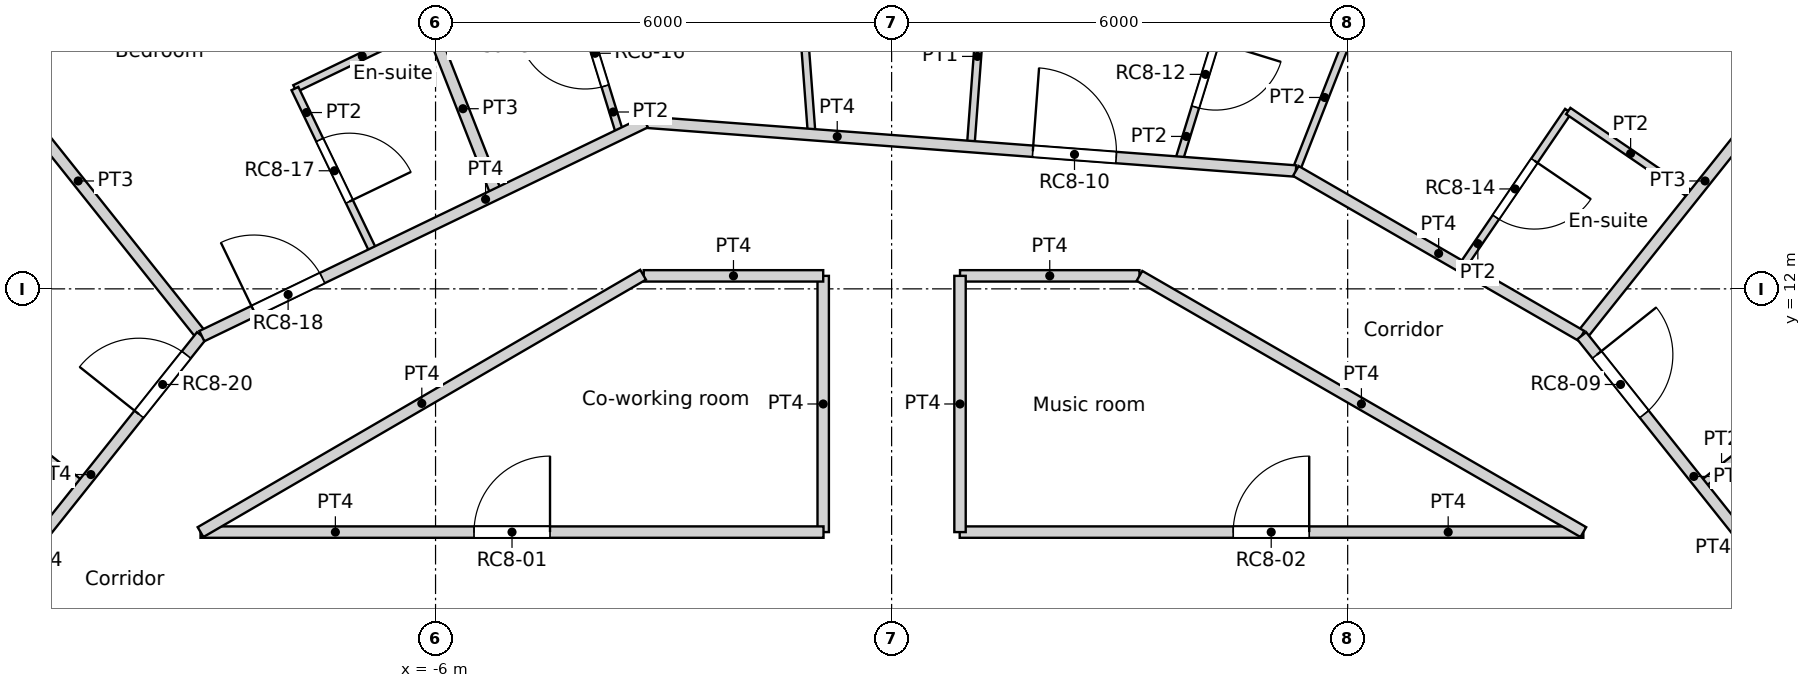
"""IFC4 building model, lengths in metres.
Left out: names, types, materials, properties, quantities, classifications, styles, units other than length and angle.
Written with IfcOpenShell. Run it as: python <this file> out.ifc"""

import sys

from ifc_helpers import new_model, si_unit, direction, frame, frame_2d, origin, place, context, subcontext, project, spatial, rectangle, extrude, element, fill, save


model = new_model("IFC4")
c1 = context("Model", 3, precision=1e-05, world=origin(), true_north=direction((0.0, 1.0)))
c2 = subcontext(c1, "Body", "Model", "MODEL_VIEW")
j1 = project(units=[si_unit("LENGTHUNIT", "METRE"), si_unit("PLANEANGLEUNIT", "RADIAN")], contexts=[c1])
p1 = place(None, origin())
s1 = spatial("IfcSite", under=j1, at=p1, CompositionType="ELEMENT")
p2 = place(p1, origin())
s2 = spatial("IfcBuilding", under=s1, at=p2, CompositionType="ELEMENT")
p3 = place(p2, frame((0.0, 0.0, 305.4)))
s3 = spatial("IfcBuildingStorey", under=s2, at=p3, CompositionType="ELEMENT", Elevation=305.4)
p4 = place(p3, frame((-9.092, 8.8, 0.0), z_axis=(0.0, 0.0, 1.0), x_axis=(0.864470922103, 0.502682827277, 0.0)))
e1 = element("IfcWall", 1, at=p4, inside=s3, PredefinedType="PARTITIONING", context=c2, shape_type="SweptSolid", body=[
    extrude(rectangle(XDim=6.735, YDim=0.15, at=frame_2d((3.368, 0.0))), origin(), (0.0, 0.0, 1.0), 3.25),
])
p5 = place(p3, frame((-9.092, 8.8, 0.0), z_axis=(0.0, 0.0, 1.0), x_axis=(1.0, 0.0, 0.0)))
e2 = element("IfcWall", 2, at=p5, inside=s3, PredefinedType="PARTITIONING", context=c2, shape_type="SweptSolid", body=[
    extrude(rectangle(XDim=8.196, YDim=0.15, at=frame_2d((4.098, 0.0))), origin(), (0.0, 0.0, 1.0), 3.25),
])
p6 = place(p5, frame((3.598, 0.0, 0.0)))
e3 = element("IfcOpeningElement", 3, at=p6, cuts=e2, PredefinedType="OPENING", context=c2, shape_type="SweptSolid", body=[
    extrude(rectangle(XDim=1.0, YDim=2.04, at=frame_2d((0.5, 1.02))), frame((0.0, 0.075, 0.0), z_axis=(0.0, -1.0, 0.0), x_axis=(1.0, 0.0, 0.0)), (0.0, 0.0, 1.0), 0.15),
])
p7 = place(p3, frame((0.896, 8.8, 0.0), z_axis=(0.0, 0.0, 1.0), x_axis=(1.0, 0.0, 0.0)))
e4 = element("IfcWall", 4, at=p7, inside=s3, PredefinedType="PARTITIONING", context=c2, shape_type="SweptSolid", body=[
    extrude(rectangle(XDim=8.205, YDim=0.15, at=frame_2d((4.102, 0.0))), origin(), (0.0, 0.0, 1.0), 3.25),
])
p8 = place(p7, frame((3.598, 0.0, 0.0)))
e5 = element("IfcOpeningElement", 5, at=p8, cuts=e4, PredefinedType="OPENING", context=c2, shape_type="SweptSolid", body=[
    extrude(rectangle(XDim=1.0, YDim=2.04, at=frame_2d((0.5, 1.02))), frame((0.0, 0.075, 0.0), z_axis=(0.0, -1.0, 0.0), x_axis=(1.0, 0.0, 0.0)), (0.0, 0.0, 1.0), 0.15),
])
p9 = place(p3, frame((9.079, 11.384, 0.0), z_axis=(0.0, 0.0, 1.0), x_axis=(0.623165080354, -0.782090328944, 0.0)))
e6 = element("IfcWall", 6, at=p9, inside=s3, PredefinedType="PARTITIONING", context=c2, shape_type="SweptSolid", body=[
    extrude(rectangle(XDim=3.564, YDim=0.15, at=frame_2d((1.782, 0.0))), origin(), (0.0, 0.0, 1.0), 3.25),
])
p10 = place(p9, frame((0.32, 0.0, 0.0)))
e7 = element("IfcOpeningElement", 7, at=p10, cuts=e6, PredefinedType="OPENING", context=c2, shape_type="SweptSolid", body=[
    extrude(rectangle(XDim=1.0, YDim=2.1, at=frame_2d((0.5, 1.05))), frame((0.0, 0.075, 0.0), z_axis=(0.0, -1.0, 0.0), x_axis=(1.0, 0.0, 0.0)), (0.0, 0.0, 1.0), 0.15),
])
p11 = place(p3, frame((-11.136, 8.802, 0.0), z_axis=(0.0, 0.0, 1.0), x_axis=(0.623151397235, 0.782101231379, 0.0)))
e8 = element("IfcWall", 8, at=p11, inside=s3, PredefinedType="PARTITIONING", context=c2, shape_type="SweptSolid", body=[
    extrude(rectangle(XDim=3.301, YDim=0.15, at=frame_2d((1.65, 0.0))), origin(), (0.0, 0.0, 1.0), 3.25),
])
p12 = place(p11, frame((1.981, 0.0, 0.0)))
e9 = element("IfcOpeningElement", 9, at=p12, cuts=e8, PredefinedType="OPENING", context=c2, shape_type="SweptSolid", body=[
    extrude(rectangle(XDim=1.0, YDim=2.1, at=frame_2d((0.5, 1.05))), frame((0.0, 0.075, 0.0), z_axis=(0.0, -1.0, 0.0), x_axis=(1.0, 0.0, 0.0)), (0.0, 0.0, 1.0), 0.15),
])
p13 = place(p3, frame((-0.9, 8.8, 0.0), z_axis=(0.0, 0.0, 1.0), x_axis=(0.0, 1.0, 0.0)))
e10 = element("IfcWall", 10, at=p13, inside=s3, PredefinedType="PARTITIONING", context=c2, shape_type="SweptSolid", body=[
    extrude(rectangle(XDim=3.371, YDim=0.15, at=frame_2d((1.686, 0.0))), origin(), (0.0, 0.0, 1.0), 3.25),
])
p14 = place(p3, frame((-3.261, 12.171, 0.0), z_axis=(0.0, 0.0, 1.0), x_axis=(1.0, 0.0, 0.0)))
e11 = element("IfcWall", 11, at=p14, inside=s3, PredefinedType="PARTITIONING", context=c2, shape_type="SweptSolid", body=[
    extrude(rectangle(XDim=2.361, YDim=0.15, at=frame_2d((1.181, 0.0))), origin(), (0.0, 0.0, 1.0), 3.25),
])
p15 = place(p3, frame((3.261, 12.171, 0.0), z_axis=(0.0, 0.0, 1.0), x_axis=(0.866066809554, -0.499928276245, 0.0)))
e12 = element("IfcWall", 12, at=p15, inside=s3, PredefinedType="PARTITIONING", context=c2, shape_type="SweptSolid", body=[
    extrude(rectangle(XDim=6.743, YDim=0.15, at=frame_2d((3.371, 0.0))), origin(), (0.0, 0.0, 1.0), 3.25),
])
p16 = place(p3, frame((0.9, 12.171, 0.0), z_axis=(0.0, 0.0, 1.0), x_axis=(1.0, 0.0, 0.0)))
e13 = element("IfcWall", 13, at=p16, inside=s3, PredefinedType="PARTITIONING", context=c2, shape_type="SweptSolid", body=[
    extrude(rectangle(XDim=2.361, YDim=0.15, at=frame_2d((1.181, 0.0))), origin(), (0.0, 0.0, 1.0), 3.25),
])
p17 = place(p3, frame((0.9, 8.8, 0.0), z_axis=(0.0, 0.0, 1.0), x_axis=(0.0, 1.0, 0.0)))
e14 = element("IfcWall", 14, at=p17, inside=s3, PredefinedType="PARTITIONING", context=c2, shape_type="SweptSolid", body=[
    extrude(rectangle(XDim=3.371, YDim=0.15, at=frame_2d((1.686, 0.0))), origin(), (0.0, 0.0, 1.0), 3.25),
])
p18 = place(p3, frame((-3.239, 14.193, 0.0), z_axis=(0.0, 0.0, 1.0), x_axis=(0.997187999346, -0.074940602878, 0.0)))
e15 = element("IfcWall", 15, at=p18, inside=s3, PredefinedType="PARTITIONING", context=c2, shape_type="SweptSolid", body=[
    extrude(rectangle(XDim=8.581, YDim=0.15, at=frame_2d((4.291, 0.0))), origin(), (0.0, 0.0, 1.0), 3.25),
])
p19 = place(p18, frame((5.111, 0.0, 0.0)))
e16 = element("IfcOpeningElement", 16, at=p19, cuts=e15, PredefinedType="OPENING", context=c2, shape_type="SweptSolid", body=[
    extrude(rectangle(XDim=1.1, YDim=2.1, at=frame_2d((0.55, 1.05))), frame((0.0, 0.075, 0.0), z_axis=(0.0, -1.0, 0.0), x_axis=(1.0, 0.0, 0.0)), (0.0, 0.0, 1.0), 0.15),
])
p20 = place(p3, frame((5.318, 13.551, 0.0), z_axis=(0.0, 0.0, 1.0), x_axis=(0.865990693744, -0.500060114735, 0.0)))
e17 = element("IfcWall", 17, at=p20, inside=s3, PredefinedType="PARTITIONING", context=c2, shape_type="SweptSolid", body=[
    extrude(rectangle(XDim=4.339, YDim=0.15, at=frame_2d((2.17, 0.0))), origin(), (0.0, 0.0, 1.0), 3.25),
])
p21 = place(p3, frame((-9.075, 11.378, 0.0), z_axis=(0.0, 0.0, 1.0), x_axis=(0.900778421649, 0.434278983018, 0.0)))
e18 = element("IfcWall", 18, at=p21, inside=s3, PredefinedType="PARTITIONING", context=c2, shape_type="SweptSolid", body=[
    extrude(rectangle(XDim=6.479, YDim=0.15, at=frame_2d((3.239, 0.0))), origin(), (0.0, 0.0, 1.0), 3.25),
])
p22 = place(p21, frame((0.76, 0.0, 0.0)))
e19 = element("IfcOpeningElement", 19, at=p22, cuts=e18, PredefinedType="OPENING", context=c2, shape_type="SweptSolid", body=[
    extrude(rectangle(XDim=1.0, YDim=2.1, at=frame_2d((0.5, 1.05))), frame((0.0, 0.075, 0.0), z_axis=(0.0, -1.0, 0.0), x_axis=(1.0, 0.0, 0.0)), (0.0, 0.0, 1.0), 0.15),
])
p23 = place(p3, frame((10.645, 9.413, 0.0), z_axis=(0.0, 0.0, 1.0), x_axis=(0.781830263661, 0.623491330191, 0.0)))
e20 = element("IfcWall", 20, at=p23, inside=s3, PredefinedType="PARTITIONING", context=c2, shape_type="SweptSolid", body=[
    extrude(rectangle(XDim=2.401, YDim=0.1, at=frame_2d((1.2, 0.0))), origin(), (0.0, 0.0, 1.0), 3.25),
])
p24 = place(p23, frame((0.751, 0.0, 0.0)))
e21 = element("IfcOpeningElement", 21, at=p24, cuts=e20, PredefinedType="OPENING", context=c2, shape_type="SweptSolid", body=[
    extrude(rectangle(XDim=0.9, YDim=2.04, at=frame_2d((0.45, 1.02))), frame((0.0, 0.05, 0.0), z_axis=(0.0, -1.0, 0.0), x_axis=(1.0, 0.0, 0.0)), (0.0, 0.0, 1.0), 0.1),
])
p25 = place(p3, frame((9.076, 11.381, 0.0), z_axis=(0.0, 0.0, 1.0), x_axis=(0.623409504508, 0.781895510723, 0.0)))
e22 = element("IfcWall", 22, at=p25, inside=s3, PredefinedType="PARTITIONING", context=c2, shape_type="SweptSolid", body=[
    extrude(rectangle(XDim=5.214, YDim=0.15, at=frame_2d((2.607, 0.0))), origin(), (0.0, 0.0, 1.0), 3.25),
])
p26 = place(p3, frame((1.04, 13.871, 0.0), z_axis=(0.0, 0.0, 1.0), x_axis=(0.074724712234, 0.997204200443, 0.0)))
e23 = element("IfcWall", 23, at=p26, inside=s3, PredefinedType="PARTITIONING", context=c2, shape_type="SweptSolid", body=[
    extrude(rectangle(XDim=5.861, YDim=0.1, at=frame_2d((2.931, 0.0))), origin(), (0.0, 0.0, 1.0), 3.25),
])
p27 = place(p26, frame((2.431, 0.0, 0.0)))
e24 = element("IfcOpeningElement", 24, at=p27, cuts=e23, PredefinedType="OPENING", context=c2, shape_type="SweptSolid", body=[
    extrude(rectangle(XDim=1.0, YDim=2.04, at=frame_2d((0.5, 1.02))), frame((0.0, 0.05, 0.0), z_axis=(0.0, -1.0, 0.0), x_axis=(1.0, 0.0, 0.0)), (0.0, 0.0, 1.0), 0.1),
])
p28 = place(p3, frame((3.773, 13.667, 0.0), z_axis=(0.0, 0.0, 1.0), x_axis=(0.295086629105, 0.955470502592, 0.0)))
e25 = element("IfcWall", 25, at=p28, inside=s3, PredefinedType="PARTITIONING", context=c2, shape_type="SweptSolid", body=[
    extrude(rectangle(XDim=2.417, YDim=0.1, at=frame_2d((1.208, 0.0))), origin(), (0.0, 0.0, 1.0), 3.25),
])
p29 = place(p28, frame((0.759, 0.0, 0.0)))
e26 = element("IfcOpeningElement", 26, at=p29, cuts=e25, PredefinedType="OPENING", context=c2, shape_type="SweptSolid", body=[
    extrude(rectangle(XDim=0.9, YDim=2.0, at=frame_2d((0.45, 1.0))), frame((0.0, 0.05, 0.0), z_axis=(0.0, -1.0, 0.0), x_axis=(1.0, 0.0, 0.0)), (0.0, 0.0, 1.0), 0.1),
])
p30 = place(p3, frame((-1.478, 19.716, 0.0), z_axis=(0.0, 0.0, 1.0), x_axis=(0.074860175832, -0.997194040332, 0.0)))
e27 = element("IfcWall", 27, at=p30, inside=s3, PredefinedType="PARTITIONING", context=c2, shape_type="SweptSolid", body=[
    extrude(rectangle(XDim=5.704, YDim=0.1, at=frame_2d((2.852, 0.0))), origin(), (0.0, 0.0, 1.0), 3.25),
])
p31 = place(p30, frame((2.182, 0.0, 0.0)))
e28 = element("IfcOpeningElement", 28, at=p31, cuts=e27, PredefinedType="OPENING", context=c2, shape_type="SweptSolid", body=[
    extrude(rectangle(XDim=0.9, YDim=2.1, at=frame_2d((0.45, 1.05))), frame((0.0, 0.05, 0.0), z_axis=(0.0, -1.0, 0.0), x_axis=(1.0, 0.0, 0.0)), (0.0, 0.0, 1.0), 0.1),
])
p32 = place(p3, frame((5.318, 13.551, 0.0), z_axis=(0.0, 0.0, 1.0), x_axis=(0.365223322063, 0.930919934807, 0.0)))
e29 = element("IfcWall", 29, at=p32, inside=s3, PredefinedType="PARTITIONING", context=c2, shape_type="SweptSolid", body=[
    extrude(rectangle(XDim=2.078, YDim=0.1, at=frame_2d((1.039, 0.0))), origin(), (0.0, 0.0, 1.0), 3.25),
])
p33 = place(p3, frame((8.902, 14.34, 0.0), z_axis=(0.0, 0.0, 1.0), x_axis=(0.826141514998, -0.563462684831, 0.0)))
e30 = element("IfcWall", 30, at=p33, inside=s3, PredefinedType="PARTITIONING", context=c2, shape_type="SweptSolid", body=[
    extrude(rectangle(XDim=1.986, YDim=0.1, at=frame_2d((0.993, 0.0))), origin(), (0.0, 0.0, 1.0), 3.25),
])
p34 = place(p3, frame((7.504, 12.289, 0.0), z_axis=(0.0, 0.0, 1.0), x_axis=(0.563272733387, 0.826271037749, 0.0)))
e31 = element("IfcWall", 31, at=p34, inside=s3, PredefinedType="PARTITIONING", context=c2, shape_type="SweptSolid", body=[
    extrude(rectangle(XDim=2.482, YDim=0.1, at=frame_2d((1.241, 0.0))), origin(), (0.0, 0.0, 1.0), 3.25),
])
p35 = place(p34, frame((0.791, 0.0, 0.0)))
e32 = element("IfcOpeningElement", 32, at=p35, cuts=e31, PredefinedType="OPENING", context=c2, shape_type="SweptSolid", body=[
    extrude(rectangle(XDim=0.9, YDim=2.04, at=frame_2d((0.45, 1.02))), frame((0.0, 0.05, 0.0), z_axis=(0.0, -1.0, 0.0), x_axis=(1.0, 0.0, 0.0)), (0.0, 0.0, 1.0), 0.1),
])
p36 = place(p3, frame((-4.231, 16.166, 0.0), z_axis=(0.0, 0.0, 1.0), x_axis=(0.295030507093, -0.955487833457, 0.0)))
e33 = element("IfcWall", 33, at=p36, inside=s3, PredefinedType="PARTITIONING", context=c2, shape_type="SweptSolid", body=[
    extrude(rectangle(XDim=2.233, YDim=0.1, at=frame_2d((1.117, 0.0))), origin(), (0.0, 0.0, 1.0), 3.25),
])
p37 = place(p36, frame((0.667, 0.0, 0.0)))
e34 = element("IfcOpeningElement", 34, at=p37, cuts=e33, PredefinedType="OPENING", context=c2, shape_type="SweptSolid", body=[
    extrude(rectangle(XDim=0.9, YDim=2.04, at=frame_2d((0.45, 1.02))), frame((0.0, 0.05, 0.0), z_axis=(0.0, -1.0, 0.0), x_axis=(1.0, 0.0, 0.0)), (0.0, 0.0, 1.0), 0.1),
])
p38 = place(p3, frame((-6.08, 15.492, 0.0), z_axis=(0.0, 0.0, 1.0), x_axis=(0.36549883342, -0.930811797717, 0.0)))
e35 = element("IfcWall", 35, at=p38, inside=s3, PredefinedType="PARTITIONING", context=c2, shape_type="SweptSolid", body=[
    extrude(rectangle(XDim=2.411, YDim=0.15, at=frame_2d((1.205, 0.0))), origin(), (0.0, 0.0, 1.0), 3.25),
])
p39 = place(p3, frame((-7.85, 14.635, 0.0), z_axis=(0.0, 0.0, 1.0), x_axis=(0.900936932599, 0.433950047216, 0.0)))
e36 = element("IfcWall", 36, at=p39, inside=s3, PredefinedType="PARTITIONING", context=c2, shape_type="SweptSolid", body=[
    extrude(rectangle(XDim=1.966, YDim=0.1, at=frame_2d((0.983, 0.0))), origin(), (0.0, 0.0, 1.0), 3.25),
])
p40 = place(p3, frame((-7.85, 14.635, 0.0), z_axis=(0.0, 0.0, 1.0), x_axis=(0.433815618773, -0.901001669759, 0.0)))
e37 = element("IfcWall", 37, at=p40, inside=s3, PredefinedType="PARTITIONING", context=c2, shape_type="SweptSolid", body=[
    extrude(rectangle(XDim=2.4, YDim=0.1, at=frame_2d((1.2, 0.0))), origin(), (0.0, 0.0, 1.0), 3.25),
])
p41 = place(p40, frame((0.75, 0.0, 0.0)))
e38 = element("IfcOpeningElement", 38, at=p41, cuts=e37, PredefinedType="OPENING", context=c2, shape_type="SweptSolid", body=[
    extrude(rectangle(XDim=0.9, YDim=2.04, at=frame_2d((0.45, 1.02))), frame((0.0, 0.05, 0.0), z_axis=(0.0, -1.0, 0.0), x_axis=(1.0, 0.0, 0.0)), (0.0, 0.0, 1.0), 0.1),
])
p42 = place(p3, frame((-12.327, 15.458, 0.0), z_axis=(0.0, 0.0, 1.0), x_axis=(0.623460949534, -0.781854490558, 0.0)))
e39 = element("IfcWall", 39, at=p42, inside=s3, PredefinedType="PARTITIONING", context=c2, shape_type="SweptSolid", body=[
    extrude(rectangle(XDim=5.214, YDim=0.15, at=frame_2d((2.607, 0.0))), origin(), (0.0, 0.0, 1.0), 3.25),
])
p43 = place(p3, frame((-12.522, 10.91, 0.0), z_axis=(0.0, 0.0, 1.0), x_axis=(0.781830263661, -0.623491330191, 0.0)))
e40 = element("IfcWall", 40, at=p43, inside=s3, PredefinedType="PARTITIONING", context=c2, shape_type="SweptSolid", body=[
    extrude(rectangle(XDim=2.401, YDim=0.1, at=frame_2d((1.2, 0.0))), origin(), (0.0, 0.0, 1.0), 3.25),
])
p44 = place(p43, frame((0.751, 0.0, 0.0)))
e41 = element("IfcOpeningElement", 41, at=p44, cuts=e40, PredefinedType="OPENING", context=c2, shape_type="SweptSolid", body=[
    extrude(rectangle(XDim=0.9, YDim=2.04, at=frame_2d((0.45, 1.02))), frame((0.0, 0.05, 0.0), z_axis=(0.0, -1.0, 0.0), x_axis=(1.0, 0.0, 0.0)), (0.0, 0.0, 1.0), 0.1),
])
p45 = place(p6, origin())
e42 = element("IfcDoor", 42, at=p45, inside=s3, OperationType="SINGLE_SWING_RIGHT", PredefinedType="DOOR", context=c2, shape_type="SweptSolid", body=[
    extrude(rectangle(XDim=1.0, YDim=2.04, at=frame_2d((0.5, 1.02))), frame((0.0, 0.025, 0.0), z_axis=(0.0, -1.0, 0.0), x_axis=(1.0, 0.0, 0.0)), (0.0, 0.0, 1.0), 0.05),
])
fill(e3, e42)
p46 = place(p8, origin())
e43 = element("IfcDoor", 43, at=p46, inside=s3, OperationType="SINGLE_SWING_RIGHT", PredefinedType="DOOR", context=c2, shape_type="SweptSolid", body=[
    extrude(rectangle(XDim=1.0, YDim=2.04, at=frame_2d((0.5, 1.02))), frame((0.0, 0.025, 0.0), z_axis=(0.0, -1.0, 0.0), x_axis=(1.0, 0.0, 0.0)), (0.0, 0.0, 1.0), 0.05),
])
fill(e5, e43)
p47 = place(p10, origin())
e44 = element("IfcDoor", 44, at=p47, inside=s3, OperationType="SINGLE_SWING_LEFT", PredefinedType="DOOR", context=c2, shape_type="SweptSolid", body=[
    extrude(rectangle(XDim=1.0, YDim=2.1, at=frame_2d((0.5, 1.05))), frame((0.0, 0.025, 0.0), z_axis=(0.0, -1.0, 0.0), x_axis=(1.0, 0.0, 0.0)), (0.0, 0.0, 1.0), 0.05),
])
fill(e7, e44)
p48 = place(p19, origin())
e45 = element("IfcDoor", 45, at=p48, inside=s3, OperationType="SINGLE_SWING_LEFT", PredefinedType="DOOR", context=c2, shape_type="SweptSolid", body=[
    extrude(rectangle(XDim=1.1, YDim=2.1, at=frame_2d((0.55, 1.05))), frame((0.0, 0.025, 0.0), z_axis=(0.0, -1.0, 0.0), x_axis=(1.0, 0.0, 0.0)), (0.0, 0.0, 1.0), 0.05),
])
fill(e16, e45)
p49 = place(p29, origin())
e46 = element("IfcDoor", 46, at=p49, inside=s3, OperationType="SINGLE_SWING_LEFT", PredefinedType="DOOR", context=c2, shape_type="SweptSolid", body=[
    extrude(rectangle(XDim=0.9, YDim=2.0, at=frame_2d((0.45, 1.0))), frame((0.0, 0.025, 0.0), z_axis=(0.0, -1.0, 0.0), x_axis=(1.0, 0.0, 0.0)), (0.0, 0.0, 1.0), 0.05),
])
fill(e26, e46)
p50 = place(p35, origin())
e47 = element("IfcDoor", 47, at=p50, inside=s3, OperationType="SINGLE_SWING_LEFT", PredefinedType="DOOR", context=c2, shape_type="SweptSolid", body=[
    extrude(rectangle(XDim=0.9, YDim=2.04, at=frame_2d((0.45, 1.02))), frame((0.0, 0.025, 0.0), z_axis=(0.0, -1.0, 0.0), x_axis=(1.0, 0.0, 0.0)), (0.0, 0.0, 1.0), 0.05),
])
fill(e32, e47)
p51 = place(p37, origin())
e48 = element("IfcDoor", 48, at=p51, inside=s3, OperationType="SINGLE_SWING_RIGHT", PredefinedType="DOOR", context=c2, shape_type="SweptSolid", body=[
    extrude(rectangle(XDim=0.9, YDim=2.04, at=frame_2d((0.45, 1.02))), frame((0.0, 0.025, 0.0), z_axis=(0.0, -1.0, 0.0), x_axis=(1.0, 0.0, 0.0)), (0.0, 0.0, 1.0), 0.05),
])
fill(e34, e48)
p52 = place(p41, origin())
e49 = element("IfcDoor", 49, at=p52, inside=s3, OperationType="SINGLE_SWING_RIGHT", PredefinedType="DOOR", context=c2, shape_type="SweptSolid", body=[
    extrude(rectangle(XDim=0.9, YDim=2.04, at=frame_2d((0.45, 1.02))), frame((0.0, 0.025, 0.0), z_axis=(0.0, -1.0, 0.0), x_axis=(1.0, 0.0, 0.0)), (0.0, 0.0, 1.0), 0.05),
])
fill(e38, e49)
p53 = place(p22, origin())
e50 = element("IfcDoor", 50, at=p53, inside=s3, OperationType="SINGLE_SWING_LEFT", PredefinedType="DOOR", context=c2, shape_type="SweptSolid", body=[
    extrude(rectangle(XDim=1.0, YDim=2.1, at=frame_2d((0.5, 1.05))), frame((0.0, 0.025, 0.0), z_axis=(0.0, -1.0, 0.0), x_axis=(1.0, 0.0, 0.0)), (0.0, 0.0, 1.0), 0.05),
])
fill(e19, e50)
p54 = place(p12, origin())
e51 = element("IfcDoor", 51, at=p54, inside=s3, OperationType="SINGLE_SWING_LEFT", PredefinedType="DOOR", context=c2, shape_type="SweptSolid", body=[
    extrude(rectangle(XDim=1.0, YDim=2.1, at=frame_2d((0.5, 1.05))), frame((0.0, 0.025, 0.0), z_axis=(0.0, -1.0, 0.0), x_axis=(1.0, 0.0, 0.0)), (0.0, 0.0, 1.0), 0.05),
])
fill(e9, e51)
save(model, sys.argv[1])
